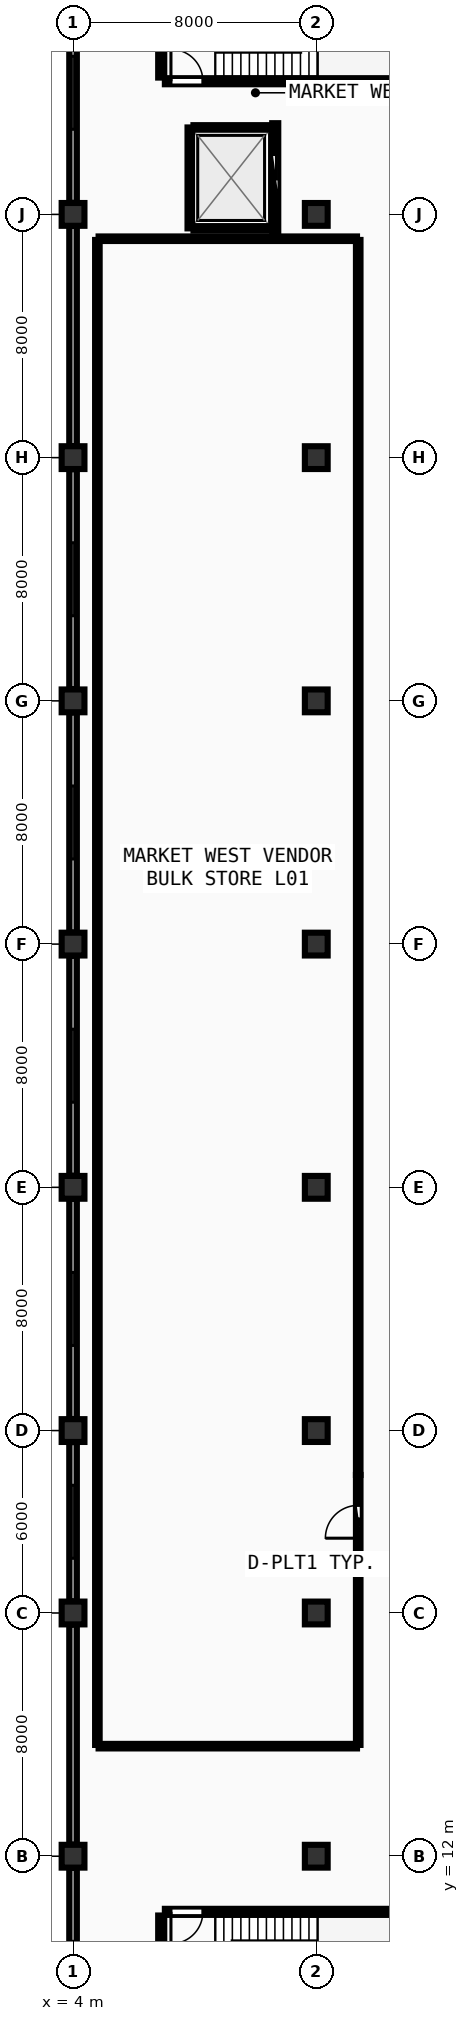
"""IFC4 building model, lengths in metres.
Left out: names, types, materials, properties, quantities, classifications, styles, units other than length and angle.
Written with IfcOpenShell. Run it as: python <this file> out.ifc"""

import sys

from ifc_helpers import new_model, si_unit, direction, frame, frame_2d, origin, origin_2d, place, context, subcontext, project, spatial, rectangle, extrude, element, fill, save


model = new_model("IFC4")
c1 = context("Model", 3, precision=1e-05, world=origin(), true_north=direction((0.0, 1.0)))
c2 = subcontext(c1, "Body", "Model", "MODEL_VIEW")
j1 = project(units=[si_unit("LENGTHUNIT", "METRE"), si_unit("PLANEANGLEUNIT", "RADIAN")], contexts=[c1])
p1 = place(None, origin())
s1 = spatial("IfcSite", under=j1, at=p1, CompositionType="ELEMENT")
p2 = place(p1, origin())
s2 = spatial("IfcBuilding", under=s1, at=p2, CompositionType="ELEMENT")
p3 = place(p2, frame((0.0, 0.0, 4.5)))
s3 = spatial("IfcBuildingStorey", under=s2, at=p3, CompositionType="ELEMENT", Elevation=4.5)
for number, where, z_axis, x_axis in (
    (1, (4.0, 12.0, 0.0), (0.0, 0.0, 1.0), (1.0, 0.0, 0.0)),
    (2, (4.0, 20.0, 0.0), (0.0, 0.0, 1.0), (1.0, 0.0, 0.0)),
    (3, (4.0, 26.0, 0.0), (0.0, 0.0, 1.0), (1.0, 0.0, 0.0)),
    (4, (4.0, 34.0, 0.0), (0.0, 0.0, 1.0), (1.0, 0.0, 0.0)),
    (5, (4.0, 42.0, 0.0), (0.0, 0.0, 1.0), (1.0, 0.0, 0.0)),
    (6, (4.0, 50.0, 0.0), (0.0, 0.0, 1.0), (1.0, 0.0, 0.0)),
    (7, (4.0, 58.0, 0.0), (0.0, 0.0, 1.0), (1.0, 0.0, 0.0)),
    (8, (4.0, 66.0, 0.0), (0.0, 0.0, 1.0), (1.0, 0.0, 0.0)),
    (9, (12.0, 12.0, 0.0), (0.0, 0.0, 1.0), (1.0, 0.0, 0.0)),
    (10, (12.0, 20.0, 0.0), (0.0, 0.0, 1.0), (1.0, 0.0, 0.0)),
    (11, (12.0, 26.0, 0.0), (0.0, 0.0, 1.0), (1.0, 0.0, 0.0)),
    (12, (12.0, 34.0, 0.0), (0.0, 0.0, 1.0), (1.0, 0.0, 0.0)),
    (13, (12.0, 42.0, 0.0), (0.0, 0.0, 1.0), (1.0, 0.0, 0.0)),
    (14, (12.0, 50.0, 0.0), (0.0, 0.0, 1.0), (1.0, 0.0, 0.0)),
    (15, (12.0, 58.0, 0.0), (0.0, 0.0, 1.0), (1.0, 0.0, 0.0)),
    (16, (12.0, 66.0, 0.0), (0.0, 0.0, 1.0), (1.0, 0.0, 0.0)),
):
    element("IfcColumn", number, at=place(p3, frame(where, z_axis=z_axis, x_axis=x_axis)), inside=s3, PredefinedType="COLUMN", context=c2, shape_type="SweptSolid", body=[
        extrude(rectangle(XDim=0.75, YDim=0.75, at=origin_2d()), origin(), (0.0, 0.0, 1.0), 4.5),
    ])
p4 = place(p3, frame((4.0, 73.62, 0.0), z_axis=(0.0, 0.0, 1.0), x_axis=(0.0, -1.0, 0.0)))
e17 = element("IfcWall", 17, at=p4, inside=s3, PredefinedType="SOLIDWALL", context=c2, shape_type="SweptSolid", body=[
    extrude(rectangle(XDim=7.24, YDim=0.25, at=frame_2d((3.62, 0.0))), origin(), (0.0, 0.0, 1.0), 3.42),
])
p5 = place(p4, frame((2.42, 0.0, 0.95)))
e18 = element("IfcOpeningElement", 18, at=p5, cuts=e17, PredefinedType="OPENING", context=c2, shape_type="SweptSolid", body=[
    extrude(rectangle(XDim=2.4, YDim=1.65, at=frame_2d((1.2, 0.825))), frame((0.0, 0.135, 0.0), z_axis=(0.0, -1.0, 0.0), x_axis=(1.0, 0.0, 0.0)), (0.0, 0.0, 1.0), 0.27),
])
p6 = place(p3, frame((4.0, 65.62, 0.0), z_axis=(0.0, 0.0, 1.0), x_axis=(0.0, -1.0, 0.0)))
e19 = element("IfcWall", 19, at=p6, inside=s3, PredefinedType="SOLIDWALL", context=c2, shape_type="SweptSolid", body=[
    extrude(rectangle(XDim=7.24, YDim=0.25, at=frame_2d((3.62, 0.0))), origin(), (0.0, 0.0, 1.0), 3.42),
])
p7 = place(p3, frame((4.0, 57.62, 0.0), z_axis=(0.0, 0.0, 1.0), x_axis=(0.0, -1.0, 0.0)))
e20 = element("IfcWall", 20, at=p7, inside=s3, PredefinedType="SOLIDWALL", context=c2, shape_type="SweptSolid", body=[
    extrude(rectangle(XDim=7.24, YDim=0.25, at=frame_2d((3.62, 0.0))), origin(), (0.0, 0.0, 1.0), 3.42),
])
p8 = place(p7, frame((2.42, 0.0, 0.95)))
e21 = element("IfcOpeningElement", 21, at=p8, cuts=e20, PredefinedType="OPENING", context=c2, shape_type="SweptSolid", body=[
    extrude(rectangle(XDim=2.4, YDim=1.65, at=frame_2d((1.2, 0.825))), frame((0.0, 0.135, 0.0), z_axis=(0.0, -1.0, 0.0), x_axis=(1.0, 0.0, 0.0)), (0.0, 0.0, 1.0), 0.27),
])
p9 = place(p3, frame((4.0, 49.62, 0.0), z_axis=(0.0, 0.0, 1.0), x_axis=(0.0, -1.0, 0.0)))
e22 = element("IfcWall", 22, at=p9, inside=s3, PredefinedType="SOLIDWALL", context=c2, shape_type="SweptSolid", body=[
    extrude(rectangle(XDim=7.24, YDim=0.25, at=frame_2d((3.62, 0.0))), origin(), (0.0, 0.0, 1.0), 3.42),
])
p10 = place(p9, frame((2.42, 0.0, 0.95)))
e23 = element("IfcOpeningElement", 23, at=p10, cuts=e22, PredefinedType="OPENING", context=c2, shape_type="SweptSolid", body=[
    extrude(rectangle(XDim=2.4, YDim=1.65, at=frame_2d((1.2, 0.825))), frame((0.0, 0.135, 0.0), z_axis=(0.0, -1.0, 0.0), x_axis=(1.0, 0.0, 0.0)), (0.0, 0.0, 1.0), 0.27),
])
p11 = place(p3, frame((4.0, 41.62, 0.0), z_axis=(0.0, 0.0, 1.0), x_axis=(0.0, -1.0, 0.0)))
e24 = element("IfcWall", 24, at=p11, inside=s3, PredefinedType="SOLIDWALL", context=c2, shape_type="SweptSolid", body=[
    extrude(rectangle(XDim=7.24, YDim=0.25, at=frame_2d((3.62, 0.0))), origin(), (0.0, 0.0, 1.0), 3.42),
])
p12 = place(p11, frame((2.42, 0.0, 0.95)))
e25 = element("IfcOpeningElement", 25, at=p12, cuts=e24, PredefinedType="OPENING", context=c2, shape_type="SweptSolid", body=[
    extrude(rectangle(XDim=2.4, YDim=1.65, at=frame_2d((1.2, 0.825))), frame((0.0, 0.135, 0.0), z_axis=(0.0, -1.0, 0.0), x_axis=(1.0, 0.0, 0.0)), (0.0, 0.0, 1.0), 0.27),
])
p13 = place(p3, frame((4.0, 33.62, 0.0), z_axis=(0.0, 0.0, 1.0), x_axis=(0.0, -1.0, 0.0)))
e26 = element("IfcWall", 26, at=p13, inside=s3, PredefinedType="SOLIDWALL", context=c2, shape_type="SweptSolid", body=[
    extrude(rectangle(XDim=7.24, YDim=0.25, at=frame_2d((3.62, 0.0))), origin(), (0.0, 0.0, 1.0), 3.42),
])
p14 = place(p13, frame((2.42, 0.0, 0.95)))
e27 = element("IfcOpeningElement", 27, at=p14, cuts=e26, PredefinedType="OPENING", context=c2, shape_type="SweptSolid", body=[
    extrude(rectangle(XDim=2.4, YDim=1.65, at=frame_2d((1.2, 0.825))), frame((0.0, 0.135, 0.0), z_axis=(0.0, -1.0, 0.0), x_axis=(1.0, 0.0, 0.0)), (0.0, 0.0, 1.0), 0.27),
])
p15 = place(p3, frame((4.0, 25.62, 0.0), z_axis=(0.0, 0.0, 1.0), x_axis=(0.0, -1.0, 0.0)))
e28 = element("IfcWall", 28, at=p15, inside=s3, PredefinedType="SOLIDWALL", context=c2, shape_type="SweptSolid", body=[
    extrude(rectangle(XDim=5.24, YDim=0.25, at=frame_2d((2.62, 0.0))), origin(), (0.0, 0.0, 1.0), 3.42),
])
p16 = place(p15, frame((1.42, 0.0, 0.95)))
e29 = element("IfcOpeningElement", 29, at=p16, cuts=e28, PredefinedType="OPENING", context=c2, shape_type="SweptSolid", body=[
    extrude(rectangle(XDim=2.4, YDim=1.65, at=frame_2d((1.2, 0.825))), frame((0.0, 0.135, 0.0), z_axis=(0.0, -1.0, 0.0), x_axis=(1.0, 0.0, 0.0)), (0.0, 0.0, 1.0), 0.27),
])
p17 = place(p3, frame((4.0, 19.62, 0.0), z_axis=(0.0, 0.0, 1.0), x_axis=(0.0, -1.0, 0.0)))
e30 = element("IfcWall", 30, at=p17, inside=s3, PredefinedType="SOLIDWALL", context=c2, shape_type="SweptSolid", body=[
    extrude(rectangle(XDim=7.24, YDim=0.25, at=frame_2d((3.62, 0.0))), origin(), (0.0, 0.0, 1.0), 3.42),
])
p18 = place(p3, frame((4.0, 11.62, 0.0), z_axis=(0.0, 0.0, 1.0), x_axis=(0.0, -1.0, 0.0)))
e31 = element("IfcWall", 31, at=p18, inside=s3, PredefinedType="SOLIDWALL", context=c2, shape_type="SweptSolid", body=[
    extrude(rectangle(XDim=7.24, YDim=0.25, at=frame_2d((3.62, 0.0))), origin(), (0.0, 0.0, 1.0), 3.42),
])
p19 = place(p18, frame((2.42, 0.0, 0.95)))
e32 = element("IfcOpeningElement", 32, at=p19, cuts=e31, PredefinedType="OPENING", context=c2, shape_type="SweptSolid", body=[
    extrude(rectangle(XDim=2.4, YDim=1.65, at=frame_2d((1.2, 0.825))), frame((0.0, 0.135, 0.0), z_axis=(0.0, -1.0, 0.0), x_axis=(1.0, 0.0, 0.0)), (0.0, 0.0, 1.0), 0.27),
])
p20 = place(p3, frame((14.78, 10.17, 0.0), z_axis=(0.0, 0.0, 1.0), x_axis=(-1.0, 0.0, 0.0)))
e33 = element("IfcWall", 33, at=p20, inside=s3, PredefinedType="SHEAR", context=c2, shape_type="SweptSolid", body=[
    extrude(rectangle(XDim=7.76, YDim=0.2, at=frame_2d((3.88, 0.0))), origin(), (0.0, 0.0, 1.0), 4.24),
])
p21 = place(p20, frame((6.51, 0.0, 0.0)))
e34 = element("IfcOpeningElement", 34, at=p21, cuts=e33, PredefinedType="OPENING", context=c2, shape_type="SweptSolid", body=[
    extrude(rectangle(XDim=1.05, YDim=2.1, at=frame_2d((0.525, 1.05))), frame((0.0, 0.11, 0.0), z_axis=(0.0, -1.0, 0.0), x_axis=(1.0, 0.0, 0.0)), (0.0, 0.0, 1.0), 0.22),
])
p22 = place(p3, frame((6.9, 10.05, 0.0), z_axis=(0.0, 0.0, 1.0), x_axis=(0.0, -1.0, 0.0)))
e35 = element("IfcWall", 35, at=p22, inside=s3, PredefinedType="SHEAR", context=c2, shape_type="SweptSolid", body=[
    extrude(rectangle(XDim=3.47, YDim=0.2, at=frame_2d((1.735, 0.0))), origin(), (0.0, 0.0, 1.0), 4.24),
])
p23 = place(p3, frame((7.02, 70.38, 0.0), z_axis=(0.0, 0.0, 1.0), x_axis=(1.0, 0.0, 0.0)))
e36 = element("IfcWall", 36, at=p23, inside=s3, PredefinedType="SHEAR", context=c2, shape_type="SweptSolid", body=[
    extrude(rectangle(XDim=7.76, YDim=0.2, at=frame_2d((3.88, 0.0))), origin(), (0.0, 0.0, 1.0), 4.24),
])
p24 = place(p23, frame((0.2, 0.0, 0.0)))
e37 = element("IfcOpeningElement", 37, at=p24, cuts=e36, PredefinedType="OPENING", context=c2, shape_type="SweptSolid", body=[
    extrude(rectangle(XDim=1.05, YDim=2.1, at=frame_2d((0.525, 1.05))), frame((0.0, 0.11, 0.0), z_axis=(0.0, -1.0, 0.0), x_axis=(1.0, 0.0, 0.0)), (0.0, 0.0, 1.0), 0.22),
])
p25 = place(p3, frame((6.9, 73.97, 0.0), z_axis=(0.0, 0.0, 1.0), x_axis=(0.0, -1.0, 0.0)))
e38 = element("IfcWall", 38, at=p25, inside=s3, PredefinedType="SHEAR", context=c2, shape_type="SweptSolid", body=[
    extrude(rectangle(XDim=3.47, YDim=0.2, at=frame_2d((1.735, 0.0))), origin(), (0.0, 0.0, 1.0), 4.24),
])
p26 = place(p3, frame((10.65, 65.4, 0.0), z_axis=(0.0, 0.0, 1.0), x_axis=(0.0, 1.0, 0.0)))
e39 = element("IfcWall", 39, at=p26, inside=s3, PredefinedType="SOLIDWALL", context=c2, shape_type="SweptSolid", body=[
    extrude(rectangle(XDim=3.6, YDim=0.2, at=frame_2d((1.8, 0.0))), origin(), (0.0, 0.0, 1.0), 3.425),
])
p27 = place(p26, frame((1.02, 0.0, 0.0)))
e40 = element("IfcOpeningElement", 40, at=p27, cuts=e39, PredefinedType="OPENING", context=c2, shape_type="SweptSolid", body=[
    extrude(rectangle(XDim=1.55, YDim=2.2, at=frame_2d((0.775, 1.1))), frame((0.0, 0.11, 0.0), z_axis=(0.0, -1.0, 0.0), x_axis=(1.0, 0.0, 0.0)), (0.0, 0.0, 1.0), 0.22),
])
p28 = place(p3, frame((7.84, 65.54, 0.0), z_axis=(0.0, 0.0, 1.0), x_axis=(0.0, 1.0, 0.0)))
e41 = element("IfcWall", 41, at=p28, inside=s3, PredefinedType="PARTITIONING", context=c2, shape_type="SweptSolid", body=[
    extrude(rectangle(XDim=3.32, YDim=0.15, at=frame_2d((1.66, 0.0))), origin(), (0.0, 0.0, 1.0), 3.425),
])
for number, where, z_axis, x_axis in (
    (42, (7.96, 65.54, 0.0), (0.0, 0.0, 1.0), (1.0, 0.0, 0.0)),
    (43, (7.96, 68.86, 0.0), (0.0, 0.0, 1.0), (1.0, 0.0, 0.0)),
):
    element("IfcWall", number, at=place(p3, frame(where, z_axis=z_axis, x_axis=x_axis)), inside=s3, PredefinedType="PARTITIONING", context=c2, shape_type="SweptSolid", body=[
        extrude(rectangle(XDim=2.56, YDim=0.15, at=frame_2d((1.28, 0.0))), origin(), (0.0, 0.0, 1.0), 4.23),
    ])
p29 = place(p3, frame((13.38, 21.46, 0.0), z_axis=(0.0, 0.0, 1.0), x_axis=(0.0, 1.0, 0.0)))
e44 = element("IfcWall", 44, at=p29, inside=s3, PredefinedType="PARTITIONING", context=c2, shape_type="SweptSolid", body=[
    extrude(rectangle(XDim=3.08, YDim=0.15, at=frame_2d((1.54, 0.0))), origin(), (0.0, 0.0, 1.0), 4.19),
])
p30 = place(p29, frame((1.0, 0.0, 0.0)))
e45 = element("IfcOpeningElement", 45, at=p30, cuts=e44, PredefinedType="OPENING", context=c2, shape_type="SweptSolid", body=[
    extrude(rectangle(XDim=1.08, YDim=2.1, at=frame_2d((0.54, 1.05))), frame((0.0, 0.085, 0.0), z_axis=(0.0, -1.0, 0.0), x_axis=(1.0, 0.0, 0.0)), (0.0, 0.0, 1.0), 0.17),
])
p31 = place(p3, frame((4.84, 15.62, 0.0), z_axis=(0.0, 0.0, 1.0), x_axis=(1.0, 0.0, 0.0)))
e46 = element("IfcWall", 46, at=p31, inside=s3, PredefinedType="PARTITIONING", context=c2, shape_type="SweptSolid", body=[
    extrude(rectangle(XDim=8.5, YDim=0.15, at=frame_2d((4.25, 0.0))), origin(), (0.0, 0.0, 1.0), 3.425),
])
p32 = place(p3, frame((13.38, 15.66, 0.0), z_axis=(0.0, 0.0, 1.0), x_axis=(0.0, 1.0, 0.0)))
e47 = element("IfcWall", 47, at=p32, inside=s3, PredefinedType="PARTITIONING", context=c2, shape_type="SweptSolid", body=[
    extrude(rectangle(XDim=5.8, YDim=0.15, at=frame_2d((2.9, 0.0))), origin(), (0.0, 0.0, 1.0), 3.425),
])
p33 = place(p3, frame((13.38, 24.54, 0.0), z_axis=(0.0, 0.0, 1.0), x_axis=(0.0, 1.0, 0.0)))
e48 = element("IfcWall", 48, at=p33, inside=s3, PredefinedType="PARTITIONING", context=c2, shape_type="SweptSolid", body=[
    extrude(rectangle(XDim=40.62, YDim=0.15, at=frame_2d((20.31, 0.0))), origin(), (0.0, 0.0, 1.0), 3.425),
])
p34 = place(p3, frame((13.34, 65.2, 0.0), z_axis=(0.0, 0.0, 1.0), x_axis=(-1.0, 0.0, 0.0)))
e49 = element("IfcWall", 49, at=p34, inside=s3, PredefinedType="PARTITIONING", context=c2, shape_type="SweptSolid", body=[
    extrude(rectangle(XDim=8.5, YDim=0.15, at=frame_2d((4.25, 0.0))), origin(), (0.0, 0.0, 1.0), 3.425),
])
p35 = place(p3, frame((4.8, 65.16, 0.0), z_axis=(0.0, 0.0, 1.0), x_axis=(0.0, -1.0, 0.0)))
e50 = element("IfcWall", 50, at=p35, inside=s3, PredefinedType="PARTITIONING", context=c2, shape_type="SweptSolid", body=[
    extrude(rectangle(XDim=49.5, YDim=0.15, at=frame_2d((24.75, 0.0))), origin(), (0.0, 0.0, 1.0), 3.425),
])
p36 = place(p5, origin())
e51 = element("IfcWindow", 51, at=p36, inside=s3, PartitioningType="SINGLE_PANEL", PredefinedType="WINDOW", context=c2, shape_type="SweptSolid", body=[
    extrude(rectangle(XDim=2.4, YDim=1.65, at=frame_2d((1.2, 0.825))), frame((0.0, 0.03, 0.0), z_axis=(0.0, -1.0, 0.0), x_axis=(1.0, 0.0, 0.0)), (0.0, 0.0, 1.0), 0.06),
])
fill(e18, e51)
p37 = place(p8, origin())
e52 = element("IfcWindow", 52, at=p37, inside=s3, PartitioningType="SINGLE_PANEL", PredefinedType="WINDOW", context=c2, shape_type="SweptSolid", body=[
    extrude(rectangle(XDim=2.4, YDim=1.65, at=frame_2d((1.2, 0.825))), frame((0.0, 0.03, 0.0), z_axis=(0.0, -1.0, 0.0), x_axis=(1.0, 0.0, 0.0)), (0.0, 0.0, 1.0), 0.06),
])
fill(e21, e52)
p38 = place(p10, origin())
e53 = element("IfcWindow", 53, at=p38, inside=s3, PartitioningType="SINGLE_PANEL", PredefinedType="WINDOW", context=c2, shape_type="SweptSolid", body=[
    extrude(rectangle(XDim=2.4, YDim=1.65, at=frame_2d((1.2, 0.825))), frame((0.0, 0.03, 0.0), z_axis=(0.0, -1.0, 0.0), x_axis=(1.0, 0.0, 0.0)), (0.0, 0.0, 1.0), 0.06),
])
fill(e23, e53)
p39 = place(p12, origin())
e54 = element("IfcWindow", 54, at=p39, inside=s3, PartitioningType="SINGLE_PANEL", PredefinedType="WINDOW", context=c2, shape_type="SweptSolid", body=[
    extrude(rectangle(XDim=2.4, YDim=1.65, at=frame_2d((1.2, 0.825))), frame((0.0, 0.03, 0.0), z_axis=(0.0, -1.0, 0.0), x_axis=(1.0, 0.0, 0.0)), (0.0, 0.0, 1.0), 0.06),
])
fill(e25, e54)
p40 = place(p14, origin())
e55 = element("IfcWindow", 55, at=p40, inside=s3, PartitioningType="SINGLE_PANEL", PredefinedType="WINDOW", context=c2, shape_type="SweptSolid", body=[
    extrude(rectangle(XDim=2.4, YDim=1.65, at=frame_2d((1.2, 0.825))), frame((0.0, 0.03, 0.0), z_axis=(0.0, -1.0, 0.0), x_axis=(1.0, 0.0, 0.0)), (0.0, 0.0, 1.0), 0.06),
])
fill(e27, e55)
p41 = place(p16, origin())
e56 = element("IfcWindow", 56, at=p41, inside=s3, PartitioningType="SINGLE_PANEL", PredefinedType="WINDOW", context=c2, shape_type="SweptSolid", body=[
    extrude(rectangle(XDim=2.4, YDim=1.65, at=frame_2d((1.2, 0.825))), frame((0.0, 0.03, 0.0), z_axis=(0.0, -1.0, 0.0), x_axis=(1.0, 0.0, 0.0)), (0.0, 0.0, 1.0), 0.06),
])
fill(e29, e56)
p42 = place(p19, origin())
e57 = element("IfcWindow", 57, at=p42, inside=s3, PartitioningType="SINGLE_PANEL", PredefinedType="WINDOW", context=c2, shape_type="SweptSolid", body=[
    extrude(rectangle(XDim=2.4, YDim=1.65, at=frame_2d((1.2, 0.825))), frame((0.0, 0.03, 0.0), z_axis=(0.0, -1.0, 0.0), x_axis=(1.0, 0.0, 0.0)), (0.0, 0.0, 1.0), 0.06),
])
fill(e32, e57)
p43 = place(p21, origin())
e58 = element("IfcDoor", 58, at=p43, inside=s3, OperationType="SINGLE_SWING_RIGHT", PredefinedType="DOOR", context=c2, shape_type="SweptSolid", body=[
    extrude(rectangle(XDim=1.05, YDim=2.1, at=frame_2d((0.525, 1.05))), frame((0.0, 0.025, 0.0), z_axis=(0.0, -1.0, 0.0), x_axis=(1.0, 0.0, 0.0)), (0.0, 0.0, 1.0), 0.05),
])
fill(e34, e58)
p44 = place(p24, origin())
e59 = element("IfcDoor", 59, at=p44, inside=s3, OperationType="SINGLE_SWING_LEFT", PredefinedType="DOOR", context=c2, shape_type="SweptSolid", body=[
    extrude(rectangle(XDim=1.05, YDim=2.1, at=frame_2d((0.525, 1.05))), frame((0.0, 0.025, 0.0), z_axis=(0.0, -1.0, 0.0), x_axis=(1.0, 0.0, 0.0)), (0.0, 0.0, 1.0), 0.05),
])
fill(e37, e59)
p45 = place(p27, origin())
e60 = element("IfcDoor", 60, at=p45, inside=s3, OperationType="DOUBLE_DOOR_SLIDING", PredefinedType="DOOR", context=c2, shape_type="SweptSolid", body=[
    extrude(rectangle(XDim=1.55, YDim=2.2, at=frame_2d((0.775, 1.1))), frame((0.0, 0.025, 0.0), z_axis=(0.0, -1.0, 0.0), x_axis=(1.0, 0.0, 0.0)), (0.0, 0.0, 1.0), 0.05),
])
fill(e40, e60)
p46 = place(p30, origin())
e61 = element("IfcDoor", 61, at=p46, inside=s3, OperationType="SINGLE_SWING_LEFT", PredefinedType="DOOR", context=c2, shape_type="SweptSolid", body=[
    extrude(rectangle(XDim=1.08, YDim=2.1, at=frame_2d((0.54, 1.05))), frame((0.0, 0.025, 0.0), z_axis=(0.0, -1.0, 0.0), x_axis=(1.0, 0.0, 0.0)), (0.0, 0.0, 1.0), 0.05),
])
fill(e45, e61)
save(model, sys.argv[1])
